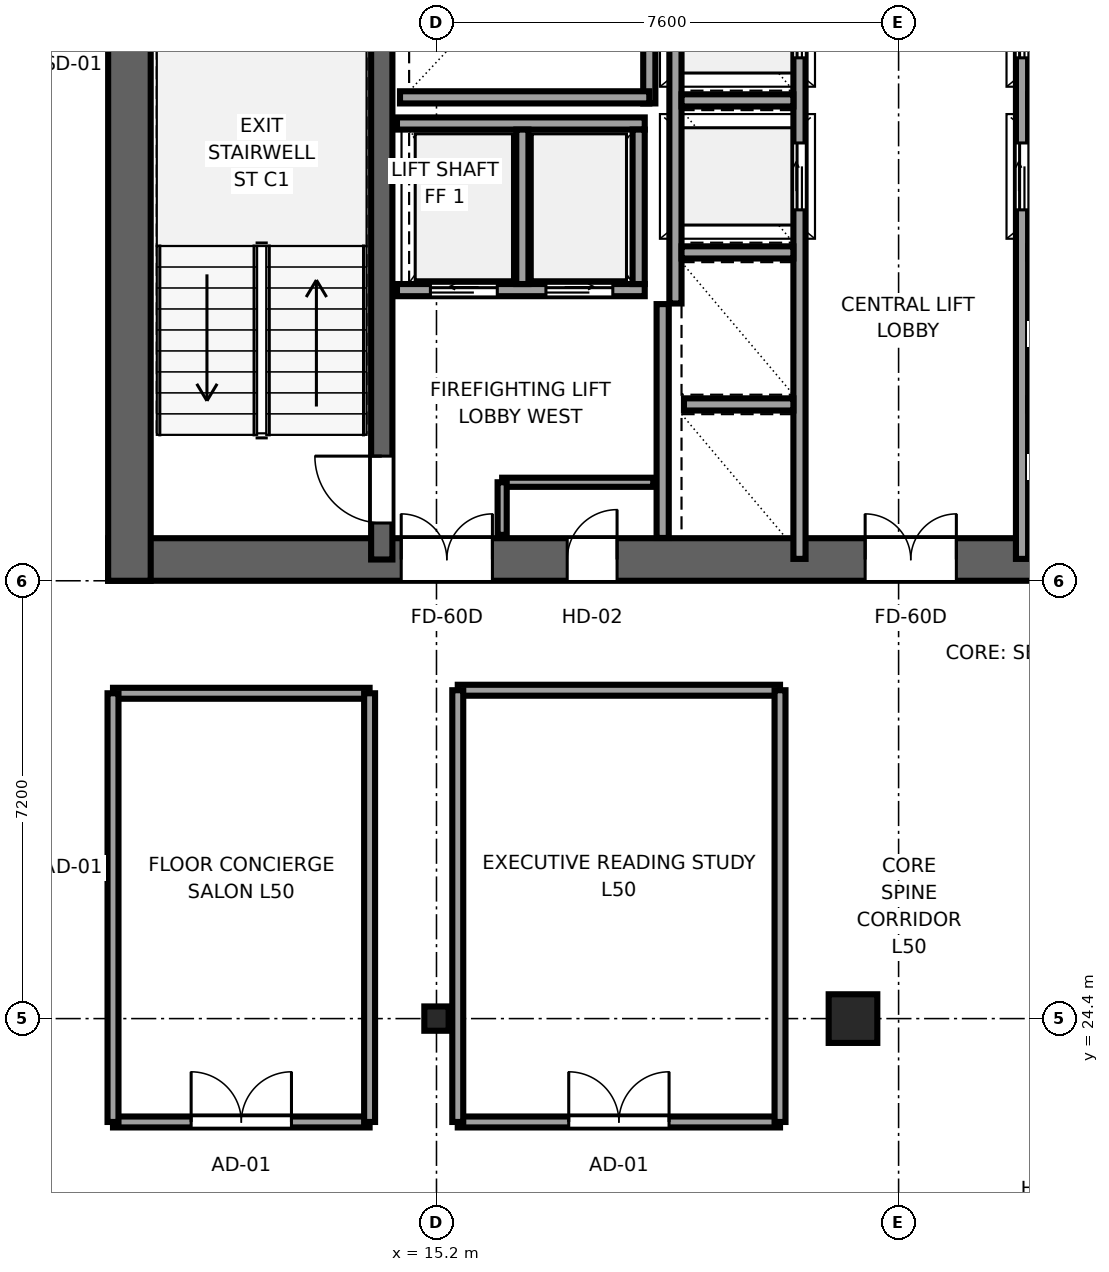
"""IFC4 building model, lengths in metres.
Left out: names, types, materials, properties, quantities, classifications, styles, units other than length and angle.
Written with IfcOpenShell. Run it as: python <this file> out.ifc"""

import sys

from ifc_helpers import new_model, si_unit, direction, frame, frame_2d, origin, origin_2d, place, context, subcontext, project, spatial, rectangle, i_section, extrude, source, transform, mapped, element, fill, save


model = new_model("IFC4")
c1 = context("Model", 3, precision=1e-05, world=origin(), true_north=direction((0.0, 1.0)))
c2 = subcontext(c1, "Body", "Model", "MODEL_VIEW")
j1 = project(units=[si_unit("LENGTHUNIT", "METRE"), si_unit("PLANEANGLEUNIT", "RADIAN")], contexts=[c1])
p1 = place(None, origin())
s1 = spatial("IfcSite", under=j1, at=p1, CompositionType="ELEMENT")
p2 = place(p1, origin())
s2 = spatial("IfcBuilding", under=s1, at=p2, CompositionType="ELEMENT")
p3 = place(p2, frame((0.0, 0.0, 191.1)))
s3 = spatial("IfcBuildingStorey", under=s2, at=p3, CompositionType="ELEMENT", Elevation=191.1)
p4 = place(p3, frame((9.8, 31.95, 0.0), z_axis=(0.0, 0.0, 1.0), x_axis=(1.0, 0.0, 0.0)))
e1 = element("IfcWall", 1, at=p4, inside=s3, PredefinedType="SHEAR", context=c2, shape_type="SweptSolid", body=[
    extrude(rectangle(XDim=26.4, YDim=0.7, at=frame_2d((13.2, 0.0))), origin(), (0.0, 0.0, 1.0), 3.55),
])
p5 = place(p4, frame((6.32, 0.0, 0.0), z_axis=(0.0, 0.0, 1.0), x_axis=(-1.0, 0.0, 0.0)))
e2 = element("IfcOpeningElement", 2, at=p5, cuts=e1, PredefinedType="OPENING", context=c2, shape_type="SweptSolid", body=[
    extrude(rectangle(XDim=1.5, YDim=2.04, at=frame_2d((0.75, 1.02))), frame((0.0, 0.36, 0.0), z_axis=(0.0, -1.0, 0.0), x_axis=(1.0, 0.0, 0.0)), (0.0, 0.0, 1.0), 0.72),
])
p6 = place(p4, frame((13.95, 0.0, 0.0), z_axis=(0.0, 0.0, 1.0), x_axis=(-1.0, 0.0, 0.0)))
e3 = element("IfcOpeningElement", 3, at=p6, cuts=e1, PredefinedType="OPENING", context=c2, shape_type="SweptSolid", body=[
    extrude(rectangle(XDim=1.5, YDim=2.04, at=frame_2d((0.75, 1.02))), frame((0.0, 0.36, 0.0), z_axis=(0.0, -1.0, 0.0), x_axis=(1.0, 0.0, 0.0)), (0.0, 0.0, 1.0), 0.72),
])
p7 = place(p4, frame((21.58, 0.0, 0.0), z_axis=(0.0, 0.0, 1.0), x_axis=(-1.0, 0.0, 0.0)))
e4 = element("IfcOpeningElement", 4, at=p7, cuts=e1, PredefinedType="OPENING", context=c2, shape_type="SweptSolid", body=[
    extrude(rectangle(XDim=1.5, YDim=2.04, at=frame_2d((0.75, 1.02))), frame((0.0, 0.36, 0.0), z_axis=(0.0, -1.0, 0.0), x_axis=(1.0, 0.0, 0.0)), (0.0, 0.0, 1.0), 0.72),
])
p8 = place(p4, frame((8.37, 0.0, 0.0), z_axis=(0.0, 0.0, 1.0), x_axis=(-1.0, 0.0, 0.0)))
e5 = element("IfcOpeningElement", 5, at=p8, cuts=e1, PredefinedType="OPENING", context=c2, shape_type="SweptSolid", body=[
    extrude(rectangle(XDim=0.82, YDim=2.01, at=frame_2d((0.41, 1.005))), frame((0.0, 0.36, 0.0), z_axis=(0.0, -1.0, 0.0), x_axis=(1.0, 0.0, 0.0)), (0.0, 0.0, 1.0), 0.72),
])
p9 = place(p4, frame((18.87, 0.0, 0.0), z_axis=(0.0, 0.0, 1.0), x_axis=(-1.0, 0.0, 0.0)))
e6 = element("IfcOpeningElement", 6, at=p9, cuts=e1, PredefinedType="OPENING", context=c2, shape_type="SweptSolid", body=[
    extrude(rectangle(XDim=0.82, YDim=2.01, at=frame_2d((0.41, 1.005))), frame((0.0, 0.36, 0.0), z_axis=(0.0, -1.0, 0.0), x_axis=(1.0, 0.0, 0.0)), (0.0, 0.0, 1.0), 0.72),
])
p10 = place(p3, frame((10.15, 31.6, 0.0), z_axis=(0.0, 0.0, 1.0), x_axis=(0.0, 1.0, 0.0)))
e7 = element("IfcWall", 7, at=p10, inside=s3, PredefinedType="SHEAR", context=c2, shape_type="SweptSolid", body=[
    extrude(rectangle(XDim=13.6, YDim=0.7, at=frame_2d((6.8, 0.0))), origin(), (0.0, 0.0, 1.0), 3.55),
])
p11 = place(p3, frame((14.3, 31.95, 0.0), z_axis=(0.0, 0.0, 1.0), x_axis=(0.0, 1.0, 0.0)))
e8 = element("IfcWall", 8, at=p11, inside=s3, PredefinedType="SHEAR", context=c2, shape_type="SweptSolid", body=[
    extrude(rectangle(XDim=12.9, YDim=0.35, at=frame_2d((6.45, 0.0))), origin(), (0.0, 0.0, 1.0), 3.55),
])
p12 = place(p11, frame((0.6, 0.0, 0.0)))
e9 = element("IfcOpeningElement", 9, at=p12, cuts=e8, PredefinedType="OPENING", context=c2, shape_type="SweptSolid", body=[
    extrude(rectangle(XDim=1.1, YDim=2.12, at=frame_2d((0.55, 1.06))), frame((0.0, 0.185, 0.0), z_axis=(0.0, -1.0, 0.0), x_axis=(1.0, 0.0, 0.0)), (0.0, 0.0, 1.0), 0.37),
])
m1 = source(origin(), c2, "Body", "SweptSolid", [
    extrude(i_section(OverallWidth=0.4, OverallDepth=0.4, WebThickness=0.02, FlangeThickness=0.035, at=origin_2d()), origin(), (0.0, 0.0, 1.0), 3.55),
])
p13 = place(p3, frame((15.2, 24.4, 0.0), z_axis=(0.0, 0.0, 1.0), x_axis=(1.0, 0.0, 0.0)))
e10 = element("IfcColumn", 10, at=p13, inside=s3, PredefinedType="COLUMN", context=c2, shape_type="MappedRepresentation", body=[
    mapped(m1, transform((0.0, 0.0, 0.0), x_axis=(1.0, 0.0, 0.0), y_axis=(0.0, 1.0, 0.0), z_axis=(0.0, 0.0, 1.0), scale=1.0)),
])
m2 = source(origin(), c2, "Body", "SweptSolid", [
    extrude(rectangle(XDim=0.8, YDim=0.8, at=origin_2d()), origin(), (0.0, 0.0, 1.0), 3.55),
])
p14 = place(p3, frame((22.05, 24.4, 0.0), z_axis=(0.0, 0.0, 1.0), x_axis=(1.0, 0.0, 0.0)))
e11 = element("IfcColumn", 11, at=p14, inside=s3, PredefinedType="COLUMN", context=c2, shape_type="MappedRepresentation", body=[
    mapped(m2, transform((0.0, 0.0, 0.0), x_axis=(1.0, 0.0, 0.0), y_axis=(0.0, 1.0, 0.0), z_axis=(0.0, 0.0, 1.0), scale=1.0)),
])
p15 = place(p3, frame((18.7, 39.45, 0.0), z_axis=(0.0, 0.0, 1.0), x_axis=(0.0, 1.0, 0.0)))
e12 = element("IfcWall", 12, at=p15, inside=s3, PredefinedType="SOLIDWALL", context=c2, shape_type="SweptSolid", body=[
    extrude(rectangle(XDim=4.4, YDim=0.2, at=frame_2d((2.2, 0.0))), origin(), (0.0, 0.0, 1.0), 3.37),
])
p16 = place(p3, frame((14.6, 39.55, 0.0), z_axis=(0.0, 0.0, 1.0), x_axis=(1.0, 0.0, 0.0)))
e13 = element("IfcWall", 13, at=p16, inside=s3, PredefinedType="SOLIDWALL", context=c2, shape_type="SweptSolid", body=[
    extrude(rectangle(XDim=4.1, YDim=0.2, at=frame_2d((2.05, 0.0))), origin(), (0.0, 0.0, 1.0), 3.37),
])
p17 = place(p3, frame((18.92, 32.304, 0.0), z_axis=(0.0, 0.0, 1.0), x_axis=(0.0, 1.0, 0.0)))
e14 = element("IfcWall", 14, at=p17, inside=s3, PredefinedType="SOLIDWALL", context=c2, shape_type="SweptSolid", body=[
    extrude(rectangle(XDim=3.846, YDim=0.2, at=frame_2d((1.923, 0.0))), origin(), (0.0, 0.0, 1.0), 3.37),
])
p18 = place(p3, frame((21.17, 31.96, 0.0), z_axis=(0.0, 0.0, 1.0), x_axis=(0.0, 1.0, 0.0)))
e15 = element("IfcWall", 15, at=p18, inside=s3, PredefinedType="SOLIDWALL", context=c2, shape_type="SweptSolid", body=[
    extrude(rectangle(XDim=12.58, YDim=0.2, at=frame_2d((6.29, 0.0))), origin(), (0.0, 0.0, 1.0), 3.37),
])
p19 = place(p18, frame((5.74, 0.0, 0.0)))
e16 = element("IfcOpeningElement", 16, at=p19, cuts=e15, PredefinedType="OPENING", context=c2, shape_type="SweptSolid", body=[
    extrude(rectangle(XDim=1.1, YDim=2.12, at=frame_2d((0.55, 1.06))), frame((0.0, 0.11, 0.0), z_axis=(0.0, -1.0, 0.0), x_axis=(1.0, 0.0, 0.0)), (0.0, 0.0, 1.0), 0.22),
])
p20 = place(p18, frame((8.24, 0.0, 0.0)))
e17 = element("IfcOpeningElement", 17, at=p20, cuts=e15, PredefinedType="OPENING", context=c2, shape_type="SweptSolid", body=[
    extrude(rectangle(XDim=1.1, YDim=2.12, at=frame_2d((0.55, 1.06))), frame((0.0, 0.11, 0.0), z_axis=(0.0, -1.0, 0.0), x_axis=(1.0, 0.0, 0.0)), (0.0, 0.0, 1.0), 0.22),
])
p21 = place(p3, frame((19.13, 36.16, 0.0), z_axis=(0.0, 0.0, 1.0), x_axis=(0.0, 1.0, 0.0)))
e18 = element("IfcWall", 18, at=p21, inside=s3, PredefinedType="SOLIDWALL", context=c2, shape_type="SweptSolid", body=[
    extrude(rectangle(XDim=8.336, YDim=0.2, at=frame_2d((4.168, 0.0))), origin(), (0.0, 0.0, 1.0), 3.37),
])
p22 = place(p3, frame((19.27, 34.5, 0.0), z_axis=(0.0, 0.0, 1.0), x_axis=(1.0, 0.0, 0.0)))
e19 = element("IfcWall", 19, at=p22, inside=s3, PredefinedType="SOLIDWALL", context=c2, shape_type="SweptSolid", body=[
    extrude(rectangle(XDim=1.8, YDim=0.2, at=frame_2d((0.9, 0.0))), origin(), (0.0, 0.0, 1.0), 3.37),
])
for number, where, z_axis, x_axis in (
    (20, (19.23, 37.0, 0.0), (0.0, 0.0, 1.0), (1.0, 0.0, 0.0)),
    (21, (19.23, 39.5, 0.0), (0.0, 0.0, 1.0), (1.0, 0.0, 0.0)),
):
    element("IfcWall", number, at=place(p3, frame(where, z_axis=z_axis, x_axis=x_axis)), inside=s3, PredefinedType="SOLIDWALL", context=c2, shape_type="SweptSolid", body=[
        extrude(rectangle(XDim=1.84, YDim=0.2, at=frame_2d((0.92, 0.0))), origin(), (0.0, 0.0, 1.0), 3.37),
    ])
p23 = place(p3, frame((14.55, 36.38, 0.0), z_axis=(0.0, 0.0, 1.0), x_axis=(1.0, 0.0, 0.0)))
e22 = element("IfcWall", 22, at=p23, inside=s3, PredefinedType="SOLIDWALL", context=c2, shape_type="SweptSolid", body=[
    extrude(rectangle(XDim=4.075, YDim=0.2, at=frame_2d((2.038, 0.0))), origin(), (0.0, 0.0, 1.0), 3.37),
])
p24 = place(p23, frame((0.55, 0.0, 0.0)))
e23 = element("IfcOpeningElement", 23, at=p24, cuts=e22, PredefinedType="OPENING", context=c2, shape_type="SweptSolid", body=[
    extrude(rectangle(XDim=1.1, YDim=2.12, at=frame_2d((0.55, 1.06))), frame((0.0, 0.11, 0.0), z_axis=(0.0, -1.0, 0.0), x_axis=(1.0, 0.0, 0.0)), (0.0, 0.0, 1.0), 0.22),
])
p25 = place(p23, frame((2.45, 0.0, 0.0)))
e24 = element("IfcOpeningElement", 24, at=p25, cuts=e22, PredefinedType="OPENING", context=c2, shape_type="SweptSolid", body=[
    extrude(rectangle(XDim=1.1, YDim=2.12, at=frame_2d((0.55, 1.06))), frame((0.0, 0.11, 0.0), z_axis=(0.0, -1.0, 0.0), x_axis=(1.0, 0.0, 0.0)), (0.0, 0.0, 1.0), 0.22),
])
p26 = place(p3, frame((14.55, 39.12, 0.0), z_axis=(0.0, 0.0, 1.0), x_axis=(1.0, 0.0, 0.0)))
e25 = element("IfcWall", 25, at=p26, inside=s3, PredefinedType="SOLIDWALL", context=c2, shape_type="SweptSolid", body=[
    extrude(rectangle(XDim=4.075, YDim=0.2, at=frame_2d((2.038, 0.0))), origin(), (0.0, 0.0, 1.0), 3.37),
])
for number, where, z_axis, x_axis in (
    (26, (18.525, 36.48, 0.0), (0.0, 0.0, 1.0), (0.0, 1.0, 0.0)),
    (27, (16.613, 36.48, 0.0), (0.0, 0.0, 1.0), (0.0, 1.0, 0.0)),
):
    element("IfcWall", number, at=place(p3, frame(where, z_axis=z_axis, x_axis=x_axis)), inside=s3, PredefinedType="SOLIDWALL", context=c2, shape_type="SweptSolid", body=[
        extrude(rectangle(XDim=2.54, YDim=0.2, at=frame_2d((1.27, 0.0))), origin(), (0.0, 0.0, 1.0), 3.37),
    ])
p27 = place(p3, frame((24.83, 31.96, 0.0), z_axis=(0.0, 0.0, 1.0), x_axis=(0.0, 1.0, 0.0)))
e28 = element("IfcWall", 28, at=p27, inside=s3, PredefinedType="SOLIDWALL", context=c2, shape_type="SweptSolid", body=[
    extrude(rectangle(XDim=12.58, YDim=0.2, at=frame_2d((6.29, 0.0))), origin(), (0.0, 0.0, 1.0), 3.37),
])
p28 = place(p27, frame((5.74, 0.0, 0.0)))
e29 = element("IfcOpeningElement", 29, at=p28, cuts=e28, PredefinedType="OPENING", context=c2, shape_type="SweptSolid", body=[
    extrude(rectangle(XDim=1.1, YDim=2.12, at=frame_2d((0.55, 1.06))), frame((0.0, 0.11, 0.0), z_axis=(0.0, -1.0, 0.0), x_axis=(1.0, 0.0, 0.0)), (0.0, 0.0, 1.0), 0.22),
])
p29 = place(p27, frame((8.24, 0.0, 0.0)))
e30 = element("IfcOpeningElement", 30, at=p29, cuts=e28, PredefinedType="OPENING", context=c2, shape_type="SweptSolid", body=[
    extrude(rectangle(XDim=1.1, YDim=2.12, at=frame_2d((0.55, 1.06))), frame((0.0, 0.11, 0.0), z_axis=(0.0, -1.0, 0.0), x_axis=(1.0, 0.0, 0.0)), (0.0, 0.0, 1.0), 0.22),
])
p30 = place(p3, frame((24.93, 34.5, 0.0), z_axis=(0.0, 0.0, 1.0), x_axis=(1.0, 0.0, 0.0)))
e31 = element("IfcWall", 31, at=p30, inside=s3, PredefinedType="SOLIDWALL", context=c2, shape_type="SweptSolid", body=[
    extrude(rectangle(XDim=1.8, YDim=0.2, at=frame_2d((0.9, 0.0))), origin(), (0.0, 0.0, 1.0), 3.37),
])
for number, where, z_axis, x_axis in (
    (32, (24.93, 37.0, 0.0), (0.0, 0.0, 1.0), (1.0, 0.0, 0.0)),
    (33, (24.93, 39.5, 0.0), (0.0, 0.0, 1.0), (1.0, 0.0, 0.0)),
):
    element("IfcWall", number, at=place(p3, frame(where, z_axis=z_axis, x_axis=x_axis)), inside=s3, PredefinedType="SOLIDWALL", context=c2, shape_type="SweptSolid", body=[
        extrude(rectangle(XDim=1.84, YDim=0.2, at=frame_2d((0.92, 0.0))), origin(), (0.0, 0.0, 1.0), 3.37),
    ])
p31 = place(p3, frame((16.28, 33.22, 0.0), z_axis=(0.0, 0.0, 1.0), x_axis=(1.0, 0.0, 0.0)))
e34 = element("IfcWall", 34, at=p31, inside=s3, PredefinedType="PARTITIONING", context=c2, shape_type="SweptSolid", body=[
    extrude(rectangle(XDim=2.485, YDim=0.15, at=frame_2d((1.242, 0.0))), origin(), (0.0, 0.0, 1.0), 3.37),
])
p32 = place(p3, frame((16.28, 32.355, 0.0), z_axis=(0.0, 0.0, 1.0), x_axis=(0.0, 1.0, 0.0)))
e35 = element("IfcWall", 35, at=p32, inside=s3, PredefinedType="PARTITIONING", context=c2, shape_type="SweptSolid", body=[
    extrude(rectangle(XDim=0.865, YDim=0.15, at=frame_2d((0.433, 0.0))), origin(), (0.0, 0.0, 1.0), 3.37),
])
p33 = place(p3, frame((9.88, 22.7, 0.0), z_axis=(0.0, 0.0, 1.0), x_axis=(1.0, 0.0, 0.0)))
e36 = element("IfcWall", 36, at=p33, inside=s3, PredefinedType="PARTITIONING", context=c2, shape_type="SweptSolid", body=[
    extrude(rectangle(XDim=4.22, YDim=0.18, at=frame_2d((2.11, 0.0))), origin(), (0.0, 0.0, 1.0), 3.37),
])
p34 = place(p33, frame((1.285, 0.0, 0.0)))
e37 = element("IfcOpeningElement", 37, at=p34, cuts=e36, PredefinedType="OPENING", context=c2, shape_type="SweptSolid", body=[
    extrude(rectangle(XDim=1.65, YDim=2.15, at=frame_2d((0.825, 1.075))), frame((0.0, 0.1, 0.0), z_axis=(0.0, -1.0, 0.0), x_axis=(1.0, 0.0, 0.0)), (0.0, 0.0, 1.0), 0.2),
])
p35 = place(p3, frame((9.88, 29.75, 0.0), z_axis=(0.0, 0.0, 1.0), x_axis=(1.0, 0.0, 0.0)))
e38 = element("IfcWall", 38, at=p35, inside=s3, PredefinedType="PARTITIONING", context=c2, shape_type="SweptSolid", body=[
    extrude(rectangle(XDim=4.22, YDim=0.18, at=frame_2d((2.11, 0.0))), origin(), (0.0, 0.0, 1.0), 3.37),
])
for number, where, z_axis, x_axis in (
    (39, (9.88, 22.7, 0.0), (0.0, 0.0, 1.0), (0.0, 1.0, 0.0)),
    (40, (14.1, 22.7, 0.0), (0.0, 0.0, 1.0), (0.0, 1.0, 0.0)),
):
    element("IfcWall", number, at=place(p3, frame(where, z_axis=z_axis, x_axis=x_axis)), inside=s3, PredefinedType="PARTITIONING", context=c2, shape_type="SweptSolid", body=[
        extrude(rectangle(XDim=7.05, YDim=0.18, at=frame_2d((3.525, 0.0))), origin(), (0.0, 0.0, 1.0), 3.37),
    ])
p36 = place(p3, frame((15.55, 22.7, 0.0), z_axis=(0.0, 0.0, 1.0), x_axis=(1.0, 0.0, 0.0)))
e41 = element("IfcWall", 41, at=p36, inside=s3, PredefinedType="PARTITIONING", context=c2, shape_type="SweptSolid", body=[
    extrude(rectangle(XDim=5.3, YDim=0.18, at=frame_2d((2.65, 0.0))), origin(), (0.0, 0.0, 1.0), 3.37),
])
p37 = place(p36, frame((1.825, 0.0, 0.0)))
e42 = element("IfcOpeningElement", 42, at=p37, cuts=e41, PredefinedType="OPENING", context=c2, shape_type="SweptSolid", body=[
    extrude(rectangle(XDim=1.65, YDim=2.15, at=frame_2d((0.825, 1.075))), frame((0.0, 0.1, 0.0), z_axis=(0.0, -1.0, 0.0), x_axis=(1.0, 0.0, 0.0)), (0.0, 0.0, 1.0), 0.2),
])
p38 = place(p3, frame((15.55, 29.8, 0.0), z_axis=(0.0, 0.0, 1.0), x_axis=(1.0, 0.0, 0.0)))
e43 = element("IfcWall", 43, at=p38, inside=s3, PredefinedType="PARTITIONING", context=c2, shape_type="SweptSolid", body=[
    extrude(rectangle(XDim=5.3, YDim=0.18, at=frame_2d((2.65, 0.0))), origin(), (0.0, 0.0, 1.0), 3.37),
])
for number, where, z_axis, x_axis in (
    (44, (15.55, 22.7, 0.0), (0.0, 0.0, 1.0), (0.0, 1.0, 0.0)),
    (45, (20.85, 22.7, 0.0), (0.0, 0.0, 1.0), (0.0, 1.0, 0.0)),
):
    element("IfcWall", number, at=place(p3, frame(where, z_axis=z_axis, x_axis=x_axis)), inside=s3, PredefinedType="PARTITIONING", context=c2, shape_type="SweptSolid", body=[
        extrude(rectangle(XDim=7.1, YDim=0.18, at=frame_2d((3.55, 0.0))), origin(), (0.0, 0.0, 1.0), 3.37),
    ])
m3 = source(origin(), c2, "Body", "SweptSolid", [
    extrude(rectangle(XDim=1.1, YDim=2.12, at=frame_2d((0.55, 1.06))), frame((0.0, 0.025, 0.0), z_axis=(0.0, -1.0, 0.0), x_axis=(1.0, 0.0, 0.0)), (0.0, 0.0, 1.0), 0.05),
])
p39 = place(p12, origin())
e46 = element("IfcDoor", 46, at=p39, inside=s3, OperationType="SINGLE_SWING_RIGHT", PredefinedType="DOOR", context=c2, shape_type="MappedRepresentation", body=[
    mapped(m3, transform((0.0, 0.0, 0.0), x_axis=(1.0, 0.0, 0.0), y_axis=(0.0, 1.0, 0.0), z_axis=(0.0, 0.0, 1.0), scale=1.0)),
])
fill(e9, e46)
m4 = source(origin(), c2, "Body", "SweptSolid", [
    extrude(rectangle(XDim=1.5, YDim=2.04, at=frame_2d((0.75, 1.02))), frame((0.0, 0.025, 0.0), z_axis=(0.0, -1.0, 0.0), x_axis=(1.0, 0.0, 0.0)), (0.0, 0.0, 1.0), 0.05),
])
p40 = place(p5, origin())
e47 = element("IfcDoor", 47, at=p40, inside=s3, OperationType="DOUBLE_DOOR_SINGLE_SWING", PredefinedType="DOOR", context=c2, shape_type="MappedRepresentation", body=[
    mapped(m4, transform((0.0, 0.0, 0.0), x_axis=(1.0, 0.0, 0.0), y_axis=(0.0, 1.0, 0.0), z_axis=(0.0, 0.0, 1.0), scale=1.0)),
])
fill(e2, e47)
p41 = place(p6, origin())
e48 = element("IfcDoor", 48, at=p41, inside=s3, OperationType="DOUBLE_DOOR_SINGLE_SWING", PredefinedType="DOOR", context=c2, shape_type="MappedRepresentation", body=[
    mapped(m4, transform((0.0, 0.0, 0.0), x_axis=(1.0, 0.0, 0.0), y_axis=(0.0, 1.0, 0.0), z_axis=(0.0, 0.0, 1.0), scale=1.0)),
])
fill(e3, e48)
m5 = source(origin(), c2, "Body", "SweptSolid", [
    extrude(rectangle(XDim=0.82, YDim=2.01, at=frame_2d((0.41, 1.005))), frame((0.0, 0.025, 0.0), z_axis=(0.0, -1.0, 0.0), x_axis=(1.0, 0.0, 0.0)), (0.0, 0.0, 1.0), 0.05),
])
p42 = place(p8, origin())
e49 = element("IfcDoor", 49, at=p42, inside=s3, OperationType="SINGLE_SWING_RIGHT", PredefinedType="DOOR", context=c2, shape_type="MappedRepresentation", body=[
    mapped(m5, transform((0.0, 0.0, 0.0), x_axis=(1.0, 0.0, 0.0), y_axis=(0.0, 1.0, 0.0), z_axis=(0.0, 0.0, 1.0), scale=1.0)),
])
fill(e5, e49)
m6 = source(origin(), c2, "Body", "SweptSolid", [
    extrude(rectangle(XDim=1.1, YDim=2.12, at=frame_2d((0.55, 1.06))), frame((0.0, 0.025, 0.0), z_axis=(0.0, -1.0, 0.0), x_axis=(1.0, 0.0, 0.0)), (0.0, 0.0, 1.0), 0.05),
])
p43 = place(p19, origin())
e50 = element("IfcDoor", 50, at=p43, inside=s3, OperationType="SLIDING_TO_RIGHT", PredefinedType="DOOR", context=c2, shape_type="MappedRepresentation", body=[
    mapped(m6, transform((0.0, 0.0, 0.0), x_axis=(1.0, 0.0, 0.0), y_axis=(0.0, 1.0, 0.0), z_axis=(0.0, 0.0, 1.0), scale=1.0)),
])
fill(e16, e50)
p44 = place(p20, origin())
e51 = element("IfcDoor", 51, at=p44, inside=s3, OperationType="SLIDING_TO_LEFT", PredefinedType="DOOR", context=c2, shape_type="MappedRepresentation", body=[
    mapped(m6, transform((0.0, 0.0, 0.0), x_axis=(1.0, 0.0, 0.0), y_axis=(0.0, 1.0, 0.0), z_axis=(0.0, 0.0, 1.0), scale=1.0)),
])
fill(e17, e51)
p45 = place(p24, origin())
e52 = element("IfcDoor", 52, at=p45, inside=s3, OperationType="SLIDING_TO_LEFT", PredefinedType="DOOR", context=c2, shape_type="MappedRepresentation", body=[
    mapped(m6, transform((0.0, 0.0, 0.0), x_axis=(1.0, 0.0, 0.0), y_axis=(0.0, 1.0, 0.0), z_axis=(0.0, 0.0, 1.0), scale=1.0)),
])
fill(e23, e52)
p46 = place(p25, origin())
e53 = element("IfcDoor", 53, at=p46, inside=s3, OperationType="SLIDING_TO_RIGHT", PredefinedType="DOOR", context=c2, shape_type="MappedRepresentation", body=[
    mapped(m6, transform((0.0, 0.0, 0.0), x_axis=(1.0, 0.0, 0.0), y_axis=(0.0, 1.0, 0.0), z_axis=(0.0, 0.0, 1.0), scale=1.0)),
])
fill(e24, e53)
p47 = place(p28, origin())
e54 = element("IfcDoor", 54, at=p47, inside=s3, OperationType="SLIDING_TO_RIGHT", PredefinedType="DOOR", context=c2, shape_type="MappedRepresentation", body=[
    mapped(m6, transform((0.0, 0.0, 0.0), x_axis=(1.0, 0.0, 0.0), y_axis=(0.0, 1.0, 0.0), z_axis=(0.0, 0.0, 1.0), scale=1.0)),
])
fill(e29, e54)
p48 = place(p29, origin())
e55 = element("IfcDoor", 55, at=p48, inside=s3, OperationType="SLIDING_TO_LEFT", PredefinedType="DOOR", context=c2, shape_type="MappedRepresentation", body=[
    mapped(m6, transform((0.0, 0.0, 0.0), x_axis=(1.0, 0.0, 0.0), y_axis=(0.0, 1.0, 0.0), z_axis=(0.0, 0.0, 1.0), scale=1.0)),
])
fill(e30, e55)
m7 = source(origin(), c2, "Body", "SweptSolid", [
    extrude(rectangle(XDim=1.65, YDim=2.15, at=frame_2d((0.825, 1.075))), frame((0.0, 0.025, 0.0), z_axis=(0.0, -1.0, 0.0), x_axis=(1.0, 0.0, 0.0)), (0.0, 0.0, 1.0), 0.05),
])
p49 = place(p34, origin())
e56 = element("IfcDoor", 56, at=p49, inside=s3, OperationType="DOUBLE_DOOR_SINGLE_SWING", PredefinedType="DOOR", context=c2, shape_type="MappedRepresentation", body=[
    mapped(m7, transform((0.0, 0.0, 0.0), x_axis=(1.0, 0.0, 0.0), y_axis=(0.0, 1.0, 0.0), z_axis=(0.0, 0.0, 1.0), scale=1.0)),
])
fill(e37, e56)
p50 = place(p37, origin())
e57 = element("IfcDoor", 57, at=p50, inside=s3, OperationType="DOUBLE_DOOR_SINGLE_SWING", PredefinedType="DOOR", context=c2, shape_type="MappedRepresentation", body=[
    mapped(m7, transform((0.0, 0.0, 0.0), x_axis=(1.0, 0.0, 0.0), y_axis=(0.0, 1.0, 0.0), z_axis=(0.0, 0.0, 1.0), scale=1.0)),
])
fill(e42, e57)
save(model, sys.argv[1])
